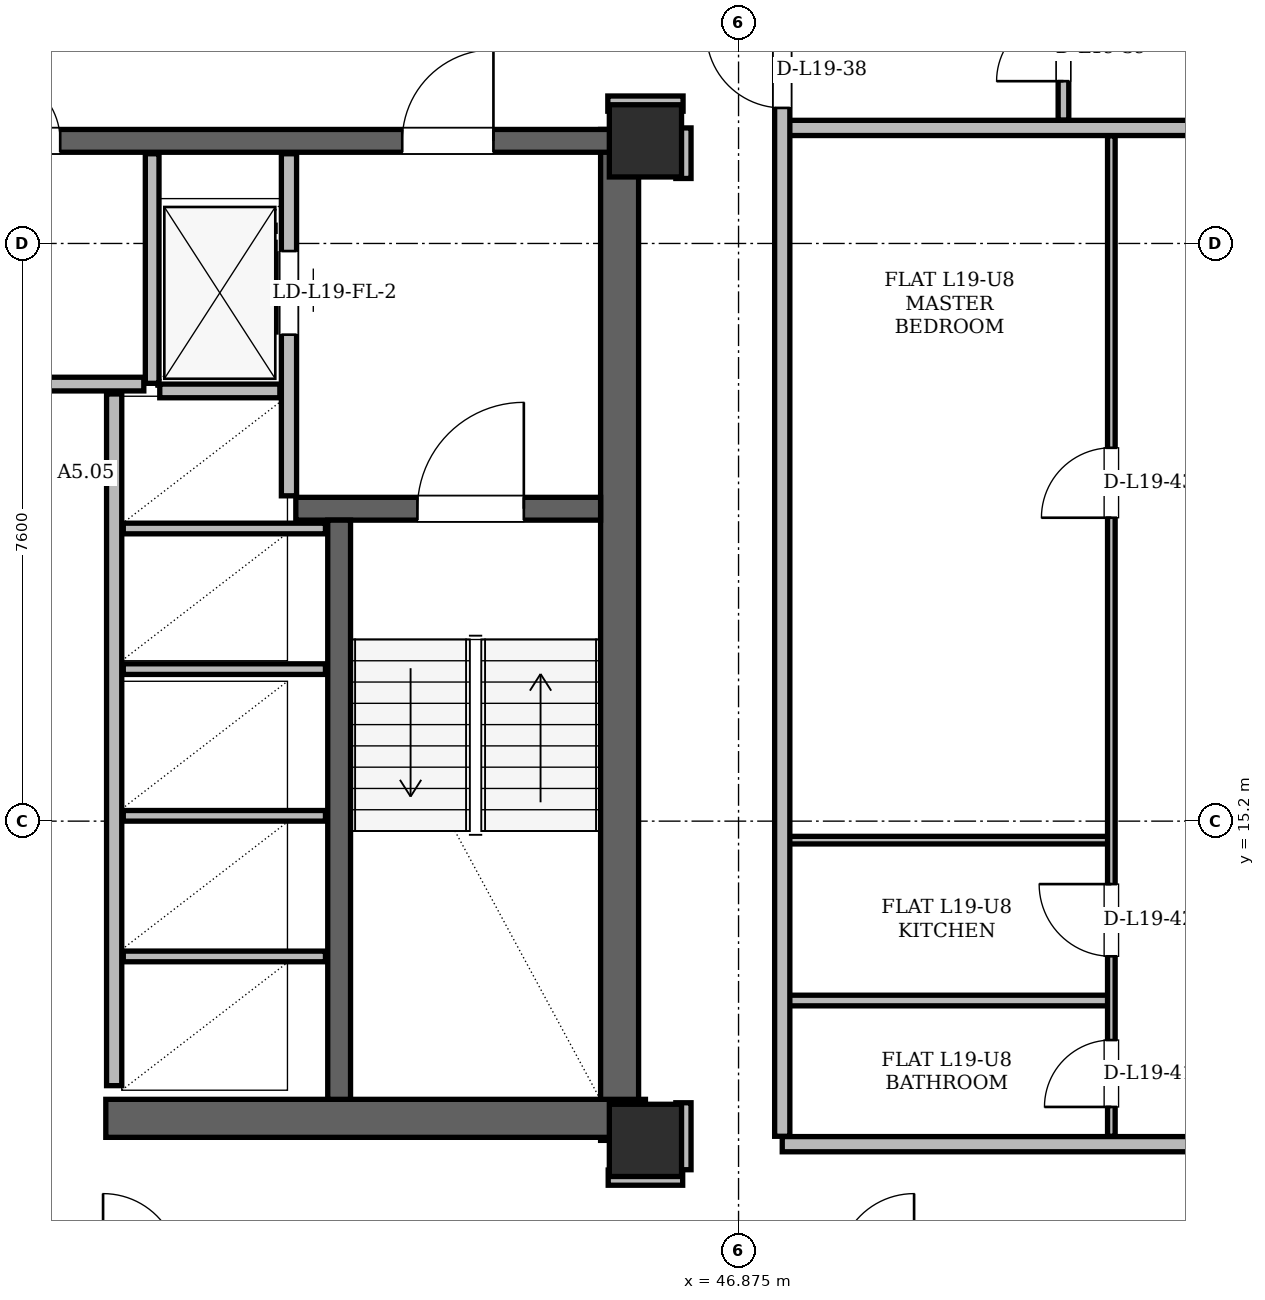
"""IFC4 building model, lengths in metres.
Left out: names, types, materials, properties, quantities, classifications, styles, units other than length and angle.
Written with IfcOpenShell. Run it as: python <this file> out.ifc"""

import sys

from ifc_helpers import new_model, si_unit, direction, frame, frame_2d, origin, origin_2d, place, context, subcontext, project, spatial, rectangle, hollow_rectangle, extrude, element, fill, save


model = new_model("IFC4")
c1 = context("Model", 3, precision=1e-05, world=origin(), true_north=direction((0.0, 1.0)))
c2 = subcontext(c1, "Body", "Model", "MODEL_VIEW")
j1 = project(units=[si_unit("LENGTHUNIT", "METRE"), si_unit("PLANEANGLEUNIT", "RADIAN")], contexts=[c1])
p1 = place(None, origin())
s1 = spatial("IfcSite", under=j1, at=p1, CompositionType="ELEMENT")
p2 = place(p1, origin())
s2 = spatial("IfcBuilding", under=s1, at=p2, CompositionType="ELEMENT")
p3 = place(p2, frame((0.0, 0.0, 74.1)))
s3 = spatial("IfcBuildingStorey", under=s2, at=p3, CompositionType="ELEMENT", Elevation=74.1)
for number, where, z_axis, x_axis in (
    (1, (45.65, 11.0, 0.0), (0.0, 0.0, 1.0), (1.0, 0.0, 0.0)),
    (2, (45.65, 24.15, 0.0), (0.0, 0.0, 1.0), (1.0, 0.0, 0.0)),
):
    element("IfcColumn", number, at=place(p3, frame(where, z_axis=z_axis, x_axis=x_axis)), inside=s3, PredefinedType="COLUMN", context=c2, shape_type="SweptSolid", body=[
        extrude(hollow_rectangle(XDim=0.95, YDim=0.95, WallThickness=0.08, at=origin_2d()), origin(), (0.0, 0.0, 1.0), 3.6),
    ])
p4 = place(p3, frame((45.31, 11.0, 0.0), z_axis=(0.0, 0.0, 1.0), x_axis=(0.0, 1.0, 0.0)))
e3 = element("IfcWall", 3, at=p4, inside=s3, PredefinedType="SHEAR", context=c2, shape_type="SweptSolid", body=[
    extrude(rectangle(XDim=13.3, YDim=0.5, at=frame_2d((6.65, 0.0))), origin(), (0.0, 0.0, 1.0), 3.34),
])
p5 = place(p3, frame((38.55, 11.29, 0.0), z_axis=(0.0, 0.0, 1.0), x_axis=(1.0, 0.0, 0.0)))
e4 = element("IfcWall", 4, at=p5, inside=s3, PredefinedType="SHEAR", context=c2, shape_type="SweptSolid", body=[
    extrude(rectangle(XDim=7.1, YDim=0.5, at=frame_2d((3.55, 0.0))), origin(), (0.0, 0.0, 1.0), 3.34),
])
p6 = place(p3, frame((29.65, 24.15, 0.0), z_axis=(0.0, 0.0, 1.0), x_axis=(1.0, 0.0, 0.0)))
e5 = element("IfcWall", 5, at=p6, inside=s3, PredefinedType="SHEAR", context=c2, shape_type="SweptSolid", body=[
    extrude(rectangle(XDim=15.7, YDim=0.3, at=frame_2d((7.85, 0.0))), origin(), (0.0, 0.0, 1.0), 3.34),
])
p7 = place(p6, frame((1.7, 0.0, 0.0)))
e6 = element("IfcOpeningElement", 6, at=p7, cuts=e5, PredefinedType="OPENING", context=c2, shape_type="SweptSolid", body=[
    extrude(rectangle(XDim=1.2, YDim=2.2, at=frame_2d((0.6, 1.1))), frame((0.0, 0.15, 0.0), z_axis=(0.0, -1.0, 0.0), x_axis=(1.0, 0.0, 0.0)), (0.0, 0.0, 1.0), 0.3),
])
p8 = place(p6, frame((12.8, 0.0, 0.0)))
e7 = element("IfcOpeningElement", 7, at=p8, cuts=e5, PredefinedType="OPENING", context=c2, shape_type="SweptSolid", body=[
    extrude(rectangle(XDim=1.2, YDim=2.2, at=frame_2d((0.6, 1.1))), frame((0.0, 0.15, 0.0), z_axis=(0.0, -1.0, 0.0), x_axis=(1.0, 0.0, 0.0)), (0.0, 0.0, 1.0), 0.3),
])
p9 = place(p6, frame((7.4, 0.0, 0.0)))
e8 = element("IfcOpeningElement", 8, at=p9, cuts=e5, PredefinedType="OPENING", context=c2, shape_type="SweptSolid", body=[
    extrude(rectangle(XDim=0.9, YDim=2.05, at=frame_2d((0.45, 1.025))), frame((0.0, 0.15, 0.0), z_axis=(0.0, -1.0, 0.0), x_axis=(1.0, 0.0, 0.0)), (0.0, 0.0, 1.0), 0.3),
])
p10 = place(p3, frame((41.05, 19.31, 0.0), z_axis=(0.0, 0.0, 1.0), x_axis=(1.0, 0.0, 0.0)))
e9 = element("IfcWall", 9, at=p10, inside=s3, PredefinedType="SHEAR", context=c2, shape_type="SweptSolid", body=[
    extrude(rectangle(XDim=4.01, YDim=0.3, at=frame_2d((2.005, 0.0))), origin(), (0.0, 0.0, 1.0), 3.34),
])
p11 = place(p10, frame((1.6, 0.0, 0.0)))
e10 = element("IfcOpeningElement", 10, at=p11, cuts=e9, PredefinedType="OPENING", context=c2, shape_type="SweptSolid", body=[
    extrude(rectangle(XDim=1.4, YDim=2.2, at=frame_2d((0.7, 1.1))), frame((0.0, 0.15, 0.0), z_axis=(0.0, -1.0, 0.0), x_axis=(1.0, 0.0, 0.0)), (0.0, 0.0, 1.0), 0.3),
])
p12 = place(p3, frame((41.62, 11.54, 0.0), z_axis=(0.0, 0.0, 1.0), x_axis=(0.0, 1.0, 0.0)))
e11 = element("IfcWall", 11, at=p12, inside=s3, PredefinedType="SHEAR", context=c2, shape_type="SweptSolid", body=[
    extrude(rectangle(XDim=7.62, YDim=0.3, at=frame_2d((3.81, 0.0))), origin(), (0.0, 0.0, 1.0), 3.34),
])
p13 = place(p3, frame((61.093, 14.127, 0.0), z_axis=(0.0, 0.0, 1.0), x_axis=(-0.500000596145, 0.8660250596, 0.0)))
e12 = element("IfcWall", 12, at=p13, inside=s3, PredefinedType="SOLIDWALL", context=c2, shape_type="SweptSolid", body=[
    extrude(rectangle(XDim=33.938, YDim=0.34, at=frame_2d((16.969, 0.0))), origin(), (0.0, 0.0, 1.0), 2.474),
])
p14 = place(p13, frame((7.824, 0.0, 0.0)))
e13 = element("IfcOpeningElement", 13, at=p14, cuts=e12, PredefinedType="OPENING", context=c2, shape_type="SweptSolid", body=[
    extrude(rectangle(XDim=1.5, YDim=2.2, at=frame_2d((0.75, 1.1))), frame((0.0, 0.17, 0.0), z_axis=(0.0, -1.0, 0.0), x_axis=(1.0, 0.0, 0.0)), (0.0, 0.0, 1.0), 0.34),
])
p15 = place(p13, frame((26.069, 0.0, 0.0)))
e14 = element("IfcOpeningElement", 14, at=p15, cuts=e12, PredefinedType="OPENING", context=c2, shape_type="SweptSolid", body=[
    extrude(rectangle(XDim=1.5, YDim=2.2, at=frame_2d((0.75, 1.1))), frame((0.0, 0.17, 0.0), z_axis=(0.0, -1.0, 0.0), x_axis=(1.0, 0.0, 0.0)), (0.0, 0.0, 1.0), 0.34),
])
p16 = place(p13, frame((1.47, 0.0, 0.85)))
e15 = element("IfcOpeningElement", 15, at=p16, cuts=e12, PredefinedType="OPENING", context=c2, shape_type="SweptSolid", body=[
    extrude(rectangle(XDim=2.2, YDim=1.514, at=frame_2d((1.1, 0.757))), frame((0.0, 0.17, 0.0), z_axis=(0.0, -1.0, 0.0), x_axis=(1.0, 0.0, 0.0)), (0.0, 0.0, 1.0), 0.34),
])
p17 = place(p13, frame((31.608, 0.0, 0.85)))
e16 = element("IfcOpeningElement", 16, at=p17, cuts=e12, PredefinedType="OPENING", context=c2, shape_type="SweptSolid", body=[
    extrude(rectangle(XDim=1.2, YDim=1.474, at=frame_2d((0.6, 0.737))), frame((0.0, 0.17, 0.0), z_axis=(0.0, -1.0, 0.0), x_axis=(1.0, 0.0, 0.0)), (0.0, 0.0, 1.0), 0.34),
])
p18 = place(p13, frame((20.038, 0.0, 0.85)))
e17 = element("IfcOpeningElement", 17, at=p18, cuts=e12, PredefinedType="OPENING", context=c2, shape_type="SweptSolid", body=[
    extrude(rectangle(XDim=2.4, YDim=1.514, at=frame_2d((1.2, 0.757))), frame((0.0, 0.17, 0.0), z_axis=(0.0, -1.0, 0.0), x_axis=(1.0, 0.0, 0.0)), (0.0, 0.0, 1.0), 0.34),
])
p19 = place(p13, frame((15.034, 0.0, 0.85)))
e18 = element("IfcOpeningElement", 18, at=p19, cuts=e12, PredefinedType="OPENING", context=c2, shape_type="SweptSolid", body=[
    extrude(rectangle(XDim=1.2, YDim=1.474, at=frame_2d((0.6, 0.737))), frame((0.0, 0.17, 0.0), z_axis=(0.0, -1.0, 0.0), x_axis=(1.0, 0.0, 0.0)), (0.0, 0.0, 1.0), 0.34),
])
p20 = place(p13, frame((17.375, 0.0, 0.85)))
e19 = element("IfcOpeningElement", 19, at=p20, cuts=e12, PredefinedType="OPENING", context=c2, shape_type="SweptSolid", body=[
    extrude(rectangle(XDim=1.4, YDim=1.514, at=frame_2d((0.7, 0.757))), frame((0.0, 0.17, 0.0), z_axis=(0.0, -1.0, 0.0), x_axis=(1.0, 0.0, 0.0)), (0.0, 0.0, 1.0), 0.34),
])
p21 = place(p13, frame((29.255, 0.0, 0.85)))
e20 = element("IfcOpeningElement", 20, at=p21, cuts=e12, PredefinedType="OPENING", context=c2, shape_type="SweptSolid", body=[
    extrude(rectangle(XDim=0.9, YDim=1.15, at=frame_2d((0.45, 0.575))), frame((0.0, 0.17, 0.0), z_axis=(0.0, -1.0, 0.0), x_axis=(1.0, 0.0, 0.0)), (0.0, 0.0, 1.0), 0.34),
])
p22 = place(p3, frame((40.96, 19.48, 0.0), z_axis=(0.0, 0.0, 1.0), x_axis=(0.0, 1.0, 0.0)))
e21 = element("IfcWall", 21, at=p22, inside=s3, PredefinedType="PARTITIONING", context=c2, shape_type="SweptSolid", body=[
    extrude(rectangle(XDim=4.5, YDim=0.2, at=frame_2d((2.25, 0.0))), origin(), (0.0, 0.0, 1.0), 2.38),
])
p23 = place(p22, frame((2.12, 0.0, 0.0)))
e22 = element("IfcOpeningElement", 22, at=p23, cuts=e21, PredefinedType="OPENING", context=c2, shape_type="SweptSolid", body=[
    extrude(rectangle(XDim=1.1, YDim=2.2, at=frame_2d((0.55, 1.1))), frame((0.0, 0.1, 0.0), z_axis=(0.0, -1.0, 0.0), x_axis=(1.0, 0.0, 0.0)), (0.0, 0.0, 1.0), 0.2),
])
p24 = place(p3, frame((39.16, 20.96, 0.0), z_axis=(0.0, 0.0, 1.0), x_axis=(0.0, 1.0, 0.0)))
e23 = element("IfcWall", 23, at=p24, inside=s3, PredefinedType="PARTITIONING", context=c2, shape_type="SweptSolid", body=[
    extrude(rectangle(XDim=3.02, YDim=0.18, at=frame_2d((1.51, 0.0))), origin(), (0.0, 0.0, 1.0), 2.38),
])
p25 = place(p3, frame((39.26, 20.86, 0.0), z_axis=(0.0, 0.0, 1.0), x_axis=(1.0, 0.0, 0.0)))
e24 = element("IfcWall", 24, at=p25, inside=s3, PredefinedType="PARTITIONING", context=c2, shape_type="SweptSolid", body=[
    extrude(rectangle(XDim=1.58, YDim=0.18, at=frame_2d((0.79, 0.0))), origin(), (0.0, 0.0, 1.0), 3.34),
])
p26 = place(p3, frame((38.66, 11.72, 0.0), z_axis=(0.0, 0.0, 1.0), x_axis=(0.0, 1.0, 0.0)))
e25 = element("IfcWall", 25, at=p26, inside=s3, PredefinedType="PARTITIONING", context=c2, shape_type="SweptSolid", body=[
    extrude(rectangle(XDim=9.1, YDim=0.2, at=frame_2d((4.55, 0.0))), origin(), (0.0, 0.0, 1.0), 3.34),
])
for number, where, z_axis, x_axis in (
    (26, (38.78, 13.42, 0.0), (0.0, 0.0, 1.0), (1.0, 0.0, 0.0)),
    (27, (38.78, 15.27, 0.0), (0.0, 0.0, 1.0), (1.0, 0.0, 0.0)),
    (28, (38.78, 17.2, 0.0), (0.0, 0.0, 1.0), (1.0, 0.0, 0.0)),
    (29, (38.78, 19.05, 0.0), (0.0, 0.0, 1.0), (1.0, 0.0, 0.0)),
):
    element("IfcWall", number, at=place(p3, frame(where, z_axis=z_axis, x_axis=x_axis)), inside=s3, PredefinedType="PARTITIONING", context=c2, shape_type="SweptSolid", body=[
        extrude(rectangle(XDim=2.66, YDim=0.14, at=frame_2d((1.33, 0.0))), origin(), (0.0, 0.0, 1.0), 3.34),
    ])
p27 = place(p3, frame((35.95, 20.95, 0.0), z_axis=(0.0, 0.0, 1.0), x_axis=(1.0, 0.0, 0.0)))
e30 = element("IfcWall", 30, at=p27, inside=s3, PredefinedType="PARTITIONING", context=c2, shape_type="SweptSolid", body=[
    extrude(rectangle(XDim=3.1, YDim=0.18, at=frame_2d((1.55, 0.0))), origin(), (0.0, 0.0, 1.0), 3.34),
])
p28 = place(p3, frame((45.16, 10.51, 0.0), z_axis=(0.0, 0.0, 1.0), x_axis=(1.0, 0.0, 0.0)))
e31 = element("IfcWall", 31, at=p28, inside=s3, PredefinedType="PARTITIONING", context=c2, shape_type="SweptSolid", body=[
    extrude(rectangle(XDim=0.98, YDim=0.2, at=frame_2d((0.49, 0.0))), origin(), (0.0, 0.0, 1.0), 2.718),
])
p29 = place(p3, frame((47.45, 10.95, 0.0), z_axis=(0.0, 0.0, 1.0), x_axis=(1.0, 0.0, 0.0)))
e32 = element("IfcWall", 32, at=p29, inside=s3, PredefinedType="PARTITIONING", context=c2, shape_type="SweptSolid", body=[
    extrude(rectangle(XDim=11.608, YDim=0.2, at=frame_2d((5.804, 0.0))), origin(), (0.0, 0.0, 1.0), 3.34),
])
p30 = place(p29, frame((5.746, 0.0, 0.0)))
e33 = element("IfcOpeningElement", 33, at=p30, cuts=e32, PredefinedType="OPENING", context=c2, shape_type="SweptSolid", body=[
    extrude(rectangle(XDim=1.0, YDim=2.18, at=frame_2d((0.5, 1.09))), frame((0.0, 0.1, 0.0), z_axis=(0.0, -1.0, 0.0), x_axis=(1.0, 0.0, 0.0)), (0.0, 0.0, 1.0), 0.2),
])
p31 = place(p3, frame((47.4, 12.84, 0.0), z_axis=(0.0, 0.0, 1.0), x_axis=(1.0, 0.0, 0.0)))
e34 = element("IfcWall", 34, at=p31, inside=s3, PredefinedType="PARTITIONING", context=c2, shape_type="SweptSolid", body=[
    extrude(rectangle(XDim=4.38, YDim=0.14, at=frame_2d((2.19, 0.0))), origin(), (0.0, 0.0, 1.0), 3.34),
])
p32 = place(p3, frame((47.4, 14.95, 0.0), z_axis=(0.0, 0.0, 1.0), x_axis=(1.0, 0.0, 0.0)))
e35 = element("IfcWall", 35, at=p32, inside=s3, PredefinedType="PARTITIONING", context=c2, shape_type="SweptSolid", body=[
    extrude(rectangle(XDim=4.38, YDim=0.1, at=frame_2d((2.19, 0.0))), origin(), (0.0, 0.0, 1.0), 2.926),
])
p33 = place(p3, frame((47.45, 24.32, 0.0), z_axis=(0.0, 0.0, 1.0), x_axis=(1.0, 0.0, 0.0)))
e36 = element("IfcWall", 36, at=p33, inside=s3, PredefinedType="PARTITIONING", context=c2, shape_type="SweptSolid", body=[
    extrude(rectangle(XDim=7.557, YDim=0.2, at=frame_2d((3.779, 0.0))), origin(), (0.0, 0.0, 1.0), 2.474),
])
p34 = place(p3, frame((45.155, 24.64, 0.0), z_axis=(0.0, 0.0, 1.0), x_axis=(1.0, 0.0, 0.0)))
e37 = element("IfcWall", 37, at=p34, inside=s3, PredefinedType="PARTITIONING", context=c2, shape_type="SweptSolid", body=[
    extrude(rectangle(XDim=0.99, YDim=0.2, at=frame_2d((0.495, 0.0))), origin(), (0.0, 0.0, 1.0), 2.718),
])
p35 = place(p3, frame((46.15, 10.614, 0.0), z_axis=(0.0, 0.0, 1.0), x_axis=(0.0, 1.0, 0.0)))
e38 = element("IfcWall", 38, at=p35, inside=s3, PredefinedType="PARTITIONING", context=c2, shape_type="SweptSolid", body=[
    extrude(rectangle(XDim=0.881, YDim=0.2, at=frame_2d((0.44, 0.0))), origin(), (0.0, 0.0, 1.0), 2.718),
])
p36 = place(p3, frame((46.15, 23.655, 0.0), z_axis=(0.0, 0.0, 1.0), x_axis=(0.0, 1.0, 0.0)))
e39 = element("IfcWall", 39, at=p36, inside=s3, PredefinedType="PARTITIONING", context=c2, shape_type="SweptSolid", body=[
    extrude(rectangle(XDim=0.665, YDim=0.2, at=frame_2d((0.333, 0.0))), origin(), (0.0, 0.0, 1.0), 2.926),
])
p37 = place(p3, frame((47.45, 11.054, 0.0), z_axis=(0.0, 0.0, 1.0), x_axis=(0.0, 1.0, 0.0)))
e40 = element("IfcWall", 40, at=p37, inside=s3, PredefinedType="PARTITIONING", context=c2, shape_type="SweptSolid", body=[
    extrude(rectangle(XDim=14.812, YDim=0.2, at=frame_2d((7.406, 0.0))), origin(), (0.0, 0.0, 1.0), 2.718),
])
p38 = place(p37, frame((13.529, 0.0, 0.0)))
e41 = element("IfcOpeningElement", 41, at=p38, cuts=e40, PredefinedType="OPENING", context=c2, shape_type="SweptSolid", body=[
    extrude(rectangle(XDim=1.0, YDim=2.18, at=frame_2d((0.5, 1.09))), frame((0.0, 0.1, 0.0), z_axis=(0.0, -1.0, 0.0), x_axis=(1.0, 0.0, 0.0)), (0.0, 0.0, 1.0), 0.2),
])
p39 = place(p3, frame((51.15, 24.424, 0.0), z_axis=(0.0, 0.0, 1.0), x_axis=(0.0, 1.0, 0.0)))
e42 = element("IfcWall", 42, at=p39, inside=s3, PredefinedType="PARTITIONING", context=c2, shape_type="SweptSolid", body=[
    extrude(rectangle(XDim=6.577, YDim=0.14, at=frame_2d((3.288, 0.0))), origin(), (0.0, 0.0, 1.0), 2.474),
])
p40 = place(p39, frame((0.511, 0.0, 0.0)))
e43 = element("IfcOpeningElement", 43, at=p40, cuts=e42, PredefinedType="OPENING", context=c2, shape_type="SweptSolid", body=[
    extrude(rectangle(XDim=0.88, YDim=2.08, at=frame_2d((0.44, 1.04))), frame((0.0, 0.07, 0.0), z_axis=(0.0, -1.0, 0.0), x_axis=(1.0, 0.0, 0.0)), (0.0, 0.0, 1.0), 0.14),
])
p41 = place(p39, frame((3.873, 0.0, 0.0)))
e44 = element("IfcOpeningElement", 44, at=p41, cuts=e42, PredefinedType="OPENING", context=c2, shape_type="SweptSolid", body=[
    extrude(rectangle(XDim=0.95, YDim=2.1, at=frame_2d((0.475, 1.05))), frame((0.0, 0.07, 0.0), z_axis=(0.0, -1.0, 0.0), x_axis=(1.0, 0.0, 0.0)), (0.0, 0.0, 1.0), 0.14),
])
p42 = place(p3, frame((51.78, 11.054, 0.0), z_axis=(0.0, 0.0, 1.0), x_axis=(0.0, 1.0, 0.0)))
e45 = element("IfcWall", 45, at=p42, inside=s3, PredefinedType="PARTITIONING", context=c2, shape_type="SweptSolid", body=[
    extrude(rectangle(XDim=13.162, YDim=0.1, at=frame_2d((6.581, 0.0))), origin(), (0.0, 0.0, 1.0), 2.718),
])
p43 = place(p42, frame((0.386, 0.0, 0.0)))
e46 = element("IfcOpeningElement", 46, at=p43, cuts=e45, PredefinedType="OPENING", context=c2, shape_type="SweptSolid", body=[
    extrude(rectangle(XDim=0.88, YDim=2.08, at=frame_2d((0.44, 1.04))), frame((0.0, 0.05, 0.0), z_axis=(0.0, -1.0, 0.0), x_axis=(1.0, 0.0, 0.0)), (0.0, 0.0, 1.0), 0.1),
])
p44 = place(p42, frame((2.368, 0.0, 0.0)))
e47 = element("IfcOpeningElement", 47, at=p44, cuts=e45, PredefinedType="OPENING", context=c2, shape_type="SweptSolid", body=[
    extrude(rectangle(XDim=0.95, YDim=2.1, at=frame_2d((0.475, 1.05))), frame((0.0, 0.05, 0.0), z_axis=(0.0, -1.0, 0.0), x_axis=(1.0, 0.0, 0.0)), (0.0, 0.0, 1.0), 0.1),
])
p45 = place(p42, frame((8.138, 0.0, 0.0)))
e48 = element("IfcOpeningElement", 48, at=p45, cuts=e45, PredefinedType="OPENING", context=c2, shape_type="SweptSolid", body=[
    extrude(rectangle(XDim=0.92, YDim=2.12, at=frame_2d((0.46, 1.06))), frame((0.0, 0.05, 0.0), z_axis=(0.0, -1.0, 0.0), x_axis=(1.0, 0.0, 0.0)), (0.0, 0.0, 1.0), 0.1),
])
p46 = place(p23, origin())
e49 = element("IfcDoor", 49, at=p46, inside=s3, OperationType="SLIDING_TO_RIGHT", PredefinedType="DOOR", context=c2, shape_type="SweptSolid", body=[
    extrude(rectangle(XDim=1.1, YDim=2.2, at=frame_2d((0.55, 1.1))), frame((0.0, 0.025, 0.0), z_axis=(0.0, -1.0, 0.0), x_axis=(1.0, 0.0, 0.0)), (0.0, 0.0, 1.0), 0.05),
])
fill(e22, e49)
p47 = place(p11, origin())
e50 = element("IfcDoor", 50, at=p47, inside=s3, OperationType="SINGLE_SWING_RIGHT", PredefinedType="DOOR", context=c2, shape_type="SweptSolid", body=[
    extrude(rectangle(XDim=1.4, YDim=2.2, at=frame_2d((0.7, 1.1))), frame((0.0, 0.025, 0.0), z_axis=(0.0, -1.0, 0.0), x_axis=(1.0, 0.0, 0.0)), (0.0, 0.0, 1.0), 0.05),
])
fill(e10, e50)
p48 = place(p8, origin())
e51 = element("IfcDoor", 51, at=p48, inside=s3, OperationType="SINGLE_SWING_RIGHT", PredefinedType="DOOR", context=c2, shape_type="SweptSolid", body=[
    extrude(rectangle(XDim=1.2, YDim=2.2, at=frame_2d((0.6, 1.1))), frame((0.0, 0.025, 0.0), z_axis=(0.0, -1.0, 0.0), x_axis=(1.0, 0.0, 0.0)), (0.0, 0.0, 1.0), 0.05),
])
fill(e7, e51)
p49 = place(p9, origin())
e52 = element("IfcDoor", 52, at=p49, inside=s3, OperationType="SINGLE_SWING_LEFT", PredefinedType="DOOR", context=c2, shape_type="SweptSolid", body=[
    extrude(rectangle(XDim=0.9, YDim=2.05, at=frame_2d((0.45, 1.025))), frame((0.0, 0.025, 0.0), z_axis=(0.0, -1.0, 0.0), x_axis=(1.0, 0.0, 0.0)), (0.0, 0.0, 1.0), 0.05),
])
fill(e8, e52)
p50 = place(p38, origin())
e53 = element("IfcDoor", 53, at=p50, inside=s3, OperationType="SINGLE_SWING_RIGHT", PredefinedType="DOOR", context=c2, shape_type="SweptSolid", body=[
    extrude(rectangle(XDim=1.0, YDim=2.18, at=frame_2d((0.5, 1.09))), frame((0.0, 0.025, 0.0), z_axis=(0.0, -1.0, 0.0), x_axis=(1.0, 0.0, 0.0)), (0.0, 0.0, 1.0), 0.05),
])
fill(e41, e53)
p51 = place(p40, origin())
e54 = element("IfcDoor", 54, at=p51, inside=s3, OperationType="SINGLE_SWING_LEFT", PredefinedType="DOOR", context=c2, shape_type="SweptSolid", body=[
    extrude(rectangle(XDim=0.88, YDim=2.08, at=frame_2d((0.44, 1.04))), frame((0.0, 0.025, 0.0), z_axis=(0.0, -1.0, 0.0), x_axis=(1.0, 0.0, 0.0)), (0.0, 0.0, 1.0), 0.05),
])
fill(e43, e54)
p52 = place(p43, origin())
e55 = element("IfcDoor", 55, at=p52, inside=s3, OperationType="SINGLE_SWING_LEFT", PredefinedType="DOOR", context=c2, shape_type="SweptSolid", body=[
    extrude(rectangle(XDim=0.88, YDim=2.08, at=frame_2d((0.44, 1.04))), frame((0.0, 0.025, 0.0), z_axis=(0.0, -1.0, 0.0), x_axis=(1.0, 0.0, 0.0)), (0.0, 0.0, 1.0), 0.05),
])
fill(e46, e55)
p53 = place(p44, origin())
e56 = element("IfcDoor", 56, at=p53, inside=s3, OperationType="SINGLE_SWING_RIGHT", PredefinedType="DOOR", context=c2, shape_type="SweptSolid", body=[
    extrude(rectangle(XDim=0.95, YDim=2.1, at=frame_2d((0.475, 1.05))), frame((0.0, 0.025, 0.0), z_axis=(0.0, -1.0, 0.0), x_axis=(1.0, 0.0, 0.0)), (0.0, 0.0, 1.0), 0.05),
])
fill(e47, e56)
p54 = place(p45, origin())
e57 = element("IfcDoor", 57, at=p54, inside=s3, OperationType="SINGLE_SWING_LEFT", PredefinedType="DOOR", context=c2, shape_type="SweptSolid", body=[
    extrude(rectangle(XDim=0.92, YDim=2.12, at=frame_2d((0.46, 1.06))), frame((0.0, 0.025, 0.0), z_axis=(0.0, -1.0, 0.0), x_axis=(1.0, 0.0, 0.0)), (0.0, 0.0, 1.0), 0.05),
])
fill(e48, e57)
save(model, sys.argv[1])
